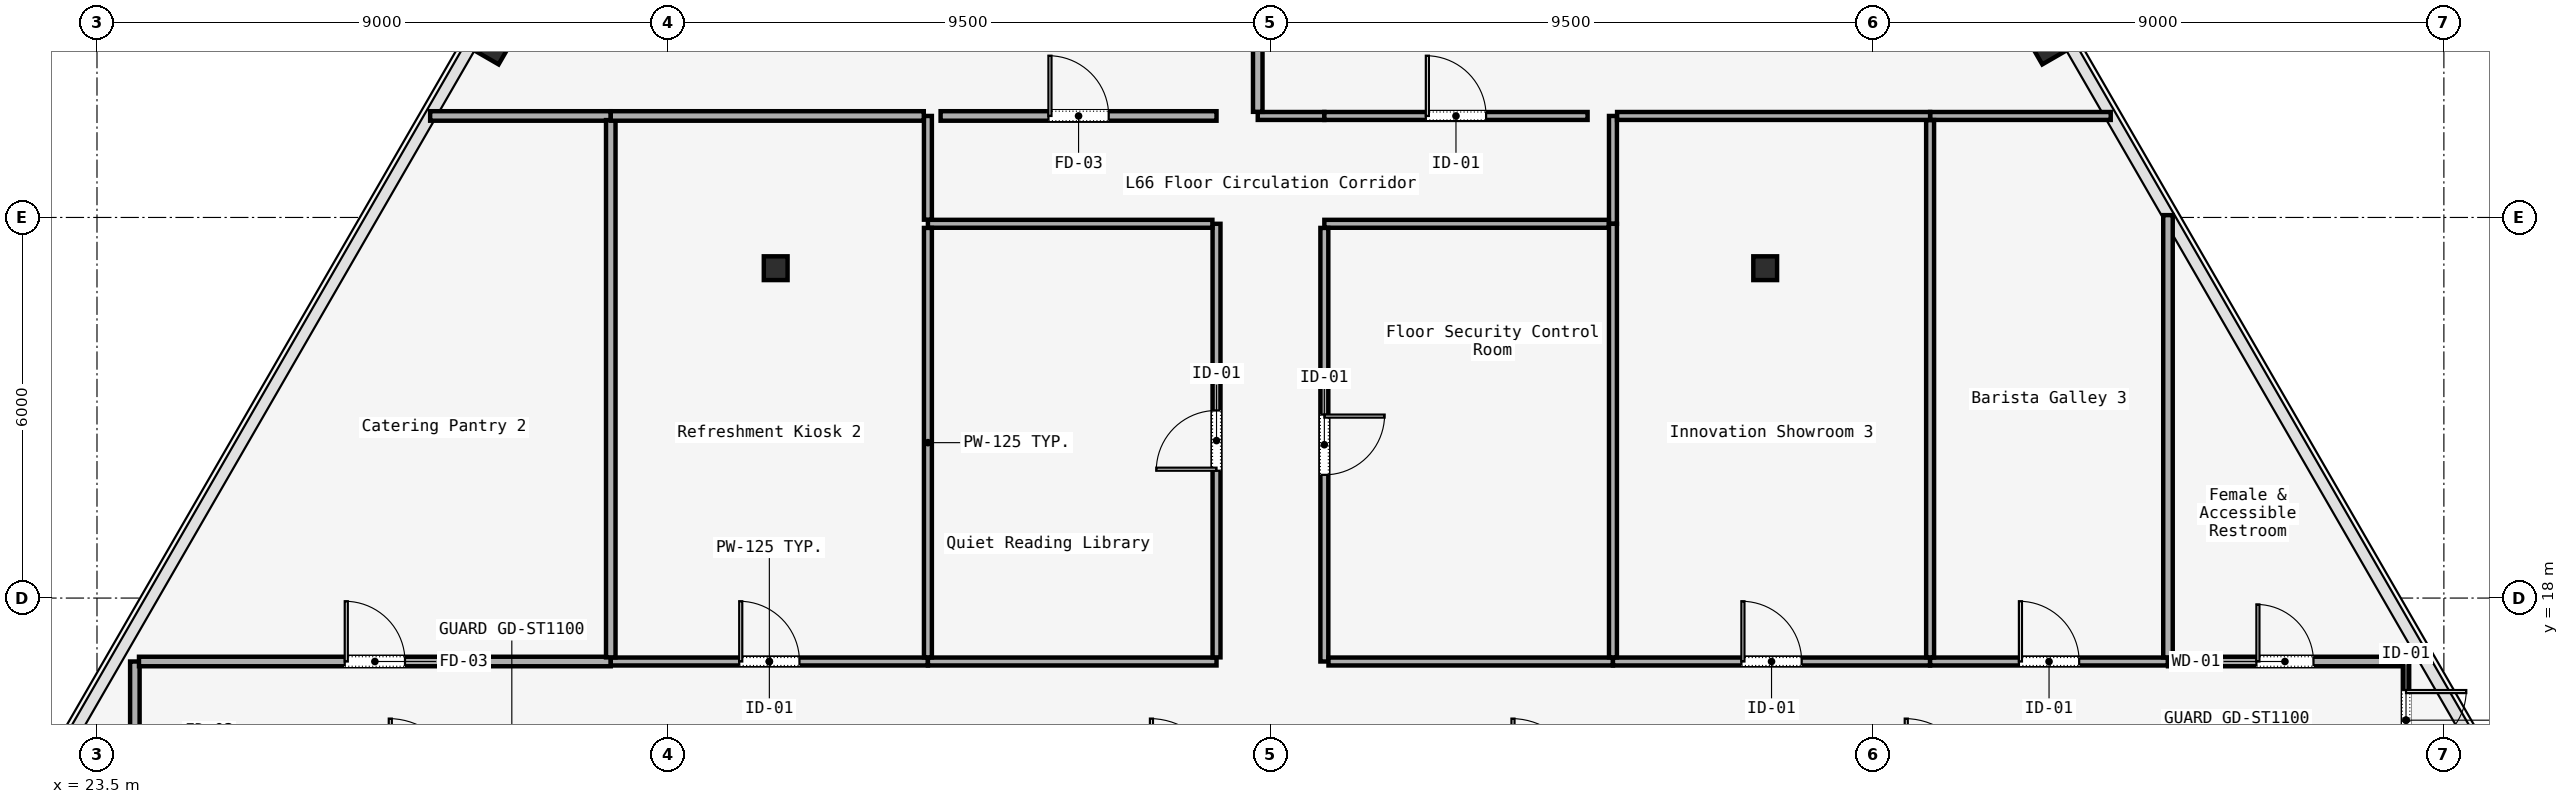
"""IFC4 building model, lengths in metres.
Left out: names, types, materials, properties, quantities, classifications, styles, units other than length and angle.
Written with IfcOpenShell. Run it as: python <this file> out.ifc"""

import sys

from ifc_helpers import new_model, si_unit, direction, frame, frame_2d, origin, origin_2d, place, context, subcontext, project, spatial, rectangle, i_section, extrude, element, fill, save


model = new_model("IFC4")
c1 = context("Model", 3, precision=1e-05, world=origin(), true_north=direction((0.0, 1.0)))
c2 = subcontext(c1, "Body", "Model", "MODEL_VIEW")
j1 = project(units=[si_unit("LENGTHUNIT", "METRE"), si_unit("PLANEANGLEUNIT", "RADIAN")], contexts=[c1])
p1 = place(None, origin())
s1 = spatial("IfcSite", under=j1, at=p1, CompositionType="ELEMENT")
p2 = place(p1, origin())
s2 = spatial("IfcBuilding", under=s1, at=p2, CompositionType="ELEMENT")
p3 = place(p2, frame((0.0, 0.0, 271.2)))
s3 = spatial("IfcBuildingStorey", under=s2, at=p3, CompositionType="ELEMENT", Elevation=271.2)
for number, where, z_axis, x_axis in (
    (1, (34.2, 23.2, 0.0), (0.0, 0.0, 1.0), (1.0, 0.0, 0.0)),
    (2, (49.8, 23.2, 0.0), (0.0, 0.0, 1.0), (1.0, 0.0, 0.0)),
):
    element("IfcColumn", number, at=place(p3, frame(where, z_axis=z_axis, x_axis=x_axis)), inside=s3, PredefinedType="COLUMN", context=c2, shape_type="SweptSolid", body=[
        extrude(i_section(OverallWidth=0.375, OverallDepth=0.375, WebThickness=0.017, FlangeThickness=0.027, FilletRadius=0.015, at=origin_2d()), origin(), (0.0, 0.0, 1.0), 3.58),
    ])
for number, where, z_axis, x_axis in (
    (3, (54.247, 26.693, 0.0), (0.0, 0.0, 1.0), (-0.5, 0.866, 0.0)),
    (4, (29.753, 26.693, 0.0), (0.0, 0.0, 1.0), (0.5, 0.866, 0.0)),
):
    element("IfcColumn", number, at=place(p3, frame(where, z_axis=z_axis, x_axis=x_axis)), inside=s3, PredefinedType="COLUMN", context=c2, shape_type="SweptSolid", body=[
        extrude(i_section(OverallWidth=0.406, OverallDepth=0.416, WebThickness=0.03, FlangeThickness=0.037, FilletRadius=0.015, at=origin_2d()), origin(), (0.0, 0.0, 1.0), 3.58),
    ])
p4 = place(p3, frame((59.903, 17.0, 0.0), z_axis=(0.0, 0.0, 1.0), x_axis=(0.0, -1.0, 0.0)))
e5 = element("IfcWall", 5, at=p4, inside=s3, PredefinedType="MOVABLE", context=c2, shape_type="SweptSolid", body=[
    extrude(rectangle(XDim=1.85, YDim=0.1, at=frame_2d((0.925, 0.0))), origin(), (0.0, 0.0, 1.0), 3.01),
])
p5 = place(p4, frame((0.45, 0.0, 0.0)))
e6 = element("IfcOpeningElement", 6, at=p5, cuts=e5, PredefinedType="OPENING", context=c2, shape_type="SweptSolid", body=[
    extrude(rectangle(XDim=0.95, YDim=2.2, at=frame_2d((0.475, 1.1))), frame((0.0, 0.05, 0.0), z_axis=(0.0, -1.0, 0.0), x_axis=(1.0, 0.0, 0.0)), (0.0, 0.0, 1.0), 0.1),
])
p6 = place(p3, frame((24.097, 15.215, 0.0), z_axis=(0.0, 0.0, 1.0), x_axis=(0.0, 1.0, 0.0)))
e7 = element("IfcWall", 7, at=p6, inside=s3, PredefinedType="PARTITIONING", context=c2, shape_type="SweptSolid", body=[
    extrude(rectangle(XDim=1.785, YDim=0.15, at=frame_2d((0.893, 0.0))), origin(), (0.0, 0.0, 1.0), 3.01),
])
p7 = place(p3, frame((24.162, 17.0, 0.0), z_axis=(0.0, 0.0, 1.0), x_axis=(1.0, 0.0, 0.0)))
e8 = element("IfcWall", 8, at=p7, inside=s3, PredefinedType="PARTITIONING", context=c2, shape_type="SweptSolid", body=[
    extrude(rectangle(XDim=7.438, YDim=0.15, at=frame_2d((3.719, 0.0))), origin(), (0.0, 0.0, 1.0), 3.01),
])
p8 = place(p7, frame((3.244, 0.0, 0.0)))
e9 = element("IfcOpeningElement", 9, at=p8, cuts=e8, PredefinedType="OPENING", context=c2, shape_type="SweptSolid", body=[
    extrude(rectangle(XDim=0.95, YDim=2.2, at=frame_2d((0.475, 1.1))), frame((0.0, 0.075, 0.0), z_axis=(0.0, -1.0, 0.0), x_axis=(1.0, 0.0, 0.0)), (0.0, 0.0, 1.0), 0.15),
])
p9 = place(p3, frame((31.6, 17.0, 0.0), z_axis=(0.0, 0.0, 1.0), x_axis=(1.0, 0.0, 0.0)))
e10 = element("IfcWall", 10, at=p9, inside=s3, PredefinedType="PARTITIONING", context=c2, shape_type="SweptSolid", body=[
    extrude(rectangle(XDim=5.0, YDim=0.125, at=frame_2d((2.5, 0.0))), origin(), (0.0, 0.0, 1.0), 3.01),
])
p10 = place(p9, frame((2.025, 0.0, 0.0)))
e11 = element("IfcOpeningElement", 11, at=p10, cuts=e10, PredefinedType="OPENING", context=c2, shape_type="SweptSolid", body=[
    extrude(rectangle(XDim=0.95, YDim=2.2, at=frame_2d((0.475, 1.1))), frame((0.0, 0.062, 0.0), z_axis=(0.0, -1.0, 0.0), x_axis=(1.0, 0.0, 0.0)), (0.0, 0.0, 1.0), 0.125),
])
p11 = place(p3, frame((36.6, 17.0, 0.0), z_axis=(0.0, 0.0, 1.0), x_axis=(1.0, 0.0, 0.0)))
e12 = element("IfcWall", 12, at=p11, inside=s3, PredefinedType="PARTITIONING", context=c2, shape_type="SweptSolid", body=[
    extrude(rectangle(XDim=4.55, YDim=0.125, at=frame_2d((2.275, 0.0))), origin(), (0.0, 0.0, 1.0), 3.01),
])
p12 = place(p3, frame((41.15, 17.065, 0.0), z_axis=(0.0, 0.0, 1.0), x_axis=(0.0, 1.0, 0.0)))
e13 = element("IfcWall", 13, at=p12, inside=s3, PredefinedType="PARTITIONING", context=c2, shape_type="SweptSolid", body=[
    extrude(rectangle(XDim=6.835, YDim=0.125, at=frame_2d((3.417, 0.0))), origin(), (0.0, 0.0, 1.0), 3.01),
])
p13 = place(p12, frame((2.942, 0.0, 0.0)))
e14 = element("IfcOpeningElement", 14, at=p13, cuts=e13, PredefinedType="OPENING", context=c2, shape_type="SweptSolid", body=[
    extrude(rectangle(XDim=0.95, YDim=2.2, at=frame_2d((0.475, 1.1))), frame((0.0, 0.062, 0.0), z_axis=(0.0, -1.0, 0.0), x_axis=(1.0, 0.0, 0.0)), (0.0, 0.0, 1.0), 0.125),
])
p14 = place(p3, frame((41.085, 23.9, 0.0), z_axis=(0.0, 0.0, 1.0), x_axis=(-1.0, 0.0, 0.0)))
e15 = element("IfcWall", 15, at=p14, inside=s3, PredefinedType="PARTITIONING", context=c2, shape_type="SweptSolid", body=[
    extrude(rectangle(XDim=4.485, YDim=0.125, at=frame_2d((2.242, 0.0))), origin(), (0.0, 0.0, 1.0), 3.01),
])
p15 = place(p3, frame((36.6, 23.965, 0.0), z_axis=(0.0, 0.0, 1.0), x_axis=(0.0, 1.0, 0.0)))
e16 = element("IfcWall", 16, at=p15, inside=s3, PredefinedType="PARTITIONING", context=c2, shape_type="SweptSolid", body=[
    extrude(rectangle(XDim=1.635, YDim=0.125, at=frame_2d((0.817, 0.0))), origin(), (0.0, 0.0, 1.0), 3.01),
])
p16 = place(p3, frame((36.8, 25.6, 0.0), z_axis=(0.0, 0.0, 1.0), x_axis=(1.0, 0.0, 0.0)))
e17 = element("IfcWall", 17, at=p16, inside=s3, PredefinedType="PARTITIONING", context=c2, shape_type="SweptSolid", body=[
    extrude(rectangle(XDim=4.35, YDim=0.15, at=frame_2d((2.175, 0.0))), origin(), (0.0, 0.0, 1.0), 3.01),
])
p17 = place(p16, frame((1.7, 0.0, 0.0)))
e18 = element("IfcOpeningElement", 18, at=p17, cuts=e17, PredefinedType="OPENING", context=c2, shape_type="SweptSolid", body=[
    extrude(rectangle(XDim=0.95, YDim=2.2, at=frame_2d((0.475, 1.1))), frame((0.0, 0.075, 0.0), z_axis=(0.0, -1.0, 0.0), x_axis=(1.0, 0.0, 0.0)), (0.0, 0.0, 1.0), 0.15),
])
p18 = place(p3, frame((41.8, 25.6, 0.0), z_axis=(0.0, 0.0, 1.0), x_axis=(1.0, 0.0, 0.0)))
e19 = element("IfcWall", 19, at=p18, inside=s3, PredefinedType="PARTITIONING", context=c2, shape_type="SweptSolid", body=[
    extrude(rectangle(XDim=1.05, YDim=0.125, at=frame_2d((0.525, 0.0))), origin(), (0.0, 0.0, 1.0), 3.01),
])
p19 = place(p3, frame((42.85, 25.6, 0.0), z_axis=(0.0, 0.0, 1.0), x_axis=(1.0, 0.0, 0.0)))
e20 = element("IfcWall", 20, at=p19, inside=s3, PredefinedType="PARTITIONING", context=c2, shape_type="SweptSolid", body=[
    extrude(rectangle(XDim=4.15, YDim=0.125, at=frame_2d((2.075, 0.0))), origin(), (0.0, 0.0, 1.0), 3.01),
])
p20 = place(p19, frame((1.6, 0.0, 0.0)))
e21 = element("IfcOpeningElement", 21, at=p20, cuts=e20, PredefinedType="OPENING", context=c2, shape_type="SweptSolid", body=[
    extrude(rectangle(XDim=0.95, YDim=2.2, at=frame_2d((0.475, 1.1))), frame((0.0, 0.062, 0.0), z_axis=(0.0, -1.0, 0.0), x_axis=(1.0, 0.0, 0.0)), (0.0, 0.0, 1.0), 0.125),
])
p21 = place(p3, frame((47.4, 25.6, 0.0), z_axis=(0.0, 0.0, 1.0), x_axis=(0.0, -1.0, 0.0)))
e22 = element("IfcWall", 22, at=p21, inside=s3, PredefinedType="PARTITIONING", context=c2, shape_type="SweptSolid", body=[
    extrude(rectangle(XDim=1.7, YDim=0.125, at=frame_2d((0.85, 0.0))), origin(), (0.0, 0.0, 1.0), 3.01),
])
p22 = place(p3, frame((47.335, 23.9, 0.0), z_axis=(0.0, 0.0, 1.0), x_axis=(-1.0, 0.0, 0.0)))
e23 = element("IfcWall", 23, at=p22, inside=s3, PredefinedType="PARTITIONING", context=c2, shape_type="SweptSolid", body=[
    extrude(rectangle(XDim=4.485, YDim=0.125, at=frame_2d((2.242, 0.0))), origin(), (0.0, 0.0, 1.0), 3.01),
])
p23 = place(p3, frame((42.85, 23.835, 0.0), z_axis=(0.0, 0.0, 1.0), x_axis=(0.0, -1.0, 0.0)))
e24 = element("IfcWall", 24, at=p23, inside=s3, PredefinedType="PARTITIONING", context=c2, shape_type="SweptSolid", body=[
    extrude(rectangle(XDim=6.835, YDim=0.125, at=frame_2d((3.417, 0.0))), origin(), (0.0, 0.0, 1.0), 3.01),
])
p24 = place(p23, frame((2.942, 0.0, 0.0)))
e25 = element("IfcOpeningElement", 25, at=p24, cuts=e24, PredefinedType="OPENING", context=c2, shape_type="SweptSolid", body=[
    extrude(rectangle(XDim=0.95, YDim=2.2, at=frame_2d((0.475, 1.1))), frame((0.0, 0.062, 0.0), z_axis=(0.0, -1.0, 0.0), x_axis=(1.0, 0.0, 0.0)), (0.0, 0.0, 1.0), 0.125),
])
p25 = place(p3, frame((42.915, 17.0, 0.0), z_axis=(0.0, 0.0, 1.0), x_axis=(1.0, 0.0, 0.0)))
e26 = element("IfcWall", 26, at=p25, inside=s3, PredefinedType="PARTITIONING", context=c2, shape_type="SweptSolid", body=[
    extrude(rectangle(XDim=4.485, YDim=0.125, at=frame_2d((2.242, 0.0))), origin(), (0.0, 0.0, 1.0), 3.01),
])
p26 = place(p3, frame((47.4, 17.0, 0.0), z_axis=(0.0, 0.0, 1.0), x_axis=(1.0, 0.0, 0.0)))
e27 = element("IfcWall", 27, at=p26, inside=s3, PredefinedType="PARTITIONING", context=c2, shape_type="SweptSolid", body=[
    extrude(rectangle(XDim=5.0, YDim=0.125, at=frame_2d((2.5, 0.0))), origin(), (0.0, 0.0, 1.0), 3.01),
])
p27 = place(p26, frame((2.025, 0.0, 0.0)))
e28 = element("IfcOpeningElement", 28, at=p27, cuts=e27, PredefinedType="OPENING", context=c2, shape_type="SweptSolid", body=[
    extrude(rectangle(XDim=0.95, YDim=2.2, at=frame_2d((0.475, 1.1))), frame((0.0, 0.062, 0.0), z_axis=(0.0, -1.0, 0.0), x_axis=(1.0, 0.0, 0.0)), (0.0, 0.0, 1.0), 0.125),
])
p28 = place(p3, frame((52.4, 17.0, 0.0), z_axis=(0.0, 0.0, 1.0), x_axis=(1.0, 0.0, 0.0)))
e29 = element("IfcWall", 29, at=p28, inside=s3, PredefinedType="PARTITIONING", context=c2, shape_type="SweptSolid", body=[
    extrude(rectangle(XDim=3.75, YDim=0.125, at=frame_2d((1.875, 0.0))), origin(), (0.0, 0.0, 1.0), 3.01),
])
p29 = place(p28, frame((1.4, 0.0, 0.0)))
e30 = element("IfcOpeningElement", 30, at=p29, cuts=e29, PredefinedType="OPENING", context=c2, shape_type="SweptSolid", body=[
    extrude(rectangle(XDim=0.95, YDim=2.2, at=frame_2d((0.475, 1.1))), frame((0.0, 0.062, 0.0), z_axis=(0.0, -1.0, 0.0), x_axis=(1.0, 0.0, 0.0)), (0.0, 0.0, 1.0), 0.125),
])
p30 = place(p3, frame((56.15, 17.0, 0.0), z_axis=(0.0, 0.0, 1.0), x_axis=(1.0, 0.0, 0.0)))
e31 = element("IfcWall", 31, at=p30, inside=s3, PredefinedType="PARTITIONING", context=c2, shape_type="SweptSolid", body=[
    extrude(rectangle(XDim=3.688, YDim=0.15, at=frame_2d((1.844, 0.0))), origin(), (0.0, 0.0, 1.0), 3.01),
])
p31 = place(p30, frame((1.394, 0.0, 0.0)))
e32 = element("IfcOpeningElement", 32, at=p31, cuts=e31, PredefinedType="OPENING", context=c2, shape_type="SweptSolid", body=[
    extrude(rectangle(XDim=0.9, YDim=2.15, at=frame_2d((0.45, 1.075))), frame((0.0, 0.075, 0.0), z_axis=(0.0, -1.0, 0.0), x_axis=(1.0, 0.0, 0.0)), (0.0, 0.0, 1.0), 0.15),
])
p32 = place(p3, frame((56.15, 17.065, 0.0), z_axis=(0.0, 0.0, 1.0), x_axis=(0.0, 1.0, 0.0)))
e33 = element("IfcWall", 33, at=p32, inside=s3, PredefinedType="PARTITIONING", context=c2, shape_type="SweptSolid", body=[
    extrude(rectangle(XDim=6.972, YDim=0.15, at=frame_2d((3.486, 0.0))), origin(), (0.0, 0.0, 1.0), 3.01),
])
p33 = place(p3, frame((36.6, 17.065, 0.0), z_axis=(0.0, 0.0, 1.0), x_axis=(0.0, 1.0, 0.0)))
e34 = element("IfcWall", 34, at=p33, inside=s3, PredefinedType="PARTITIONING", context=c2, shape_type="SweptSolid", body=[
    extrude(rectangle(XDim=6.77, YDim=0.125, at=frame_2d((3.385, 0.0))), origin(), (0.0, 0.0, 1.0), 3.01),
])
p34 = place(p3, frame((47.4, 23.9, 0.0), z_axis=(0.0, 0.0, 1.0), x_axis=(0.0, -1.0, 0.0)))
e35 = element("IfcWall", 35, at=p34, inside=s3, PredefinedType="PARTITIONING", context=c2, shape_type="SweptSolid", body=[
    extrude(rectangle(XDim=6.835, YDim=0.125, at=frame_2d((3.417, 0.0))), origin(), (0.0, 0.0, 1.0), 3.01),
])
p35 = place(p3, frame((28.752, 25.6, 0.0), z_axis=(0.0, 0.0, 1.0), x_axis=(1.0, 0.0, 0.0)))
e36 = element("IfcWall", 36, at=p35, inside=s3, PredefinedType="PARTITIONING", context=c2, shape_type="SweptSolid", body=[
    extrude(rectangle(XDim=2.848, YDim=0.15, at=frame_2d((1.424, 0.0))), origin(), (0.0, 0.0, 1.0), 3.01),
])
p36 = place(p3, frame((31.6, 25.535, 0.0), z_axis=(0.0, 0.0, 1.0), x_axis=(0.0, -1.0, 0.0)))
e37 = element("IfcWall", 37, at=p36, inside=s3, PredefinedType="PARTITIONING", context=c2, shape_type="SweptSolid", body=[
    extrude(rectangle(XDim=8.47, YDim=0.15, at=frame_2d((4.235, 0.0))), origin(), (0.0, 0.0, 1.0), 3.01),
])
p37 = place(p3, frame((52.4, 25.6, 0.0), z_axis=(0.0, 0.0, 1.0), x_axis=(1.0, 0.0, 0.0)))
e38 = element("IfcWall", 38, at=p37, inside=s3, PredefinedType="PARTITIONING", context=c2, shape_type="SweptSolid", body=[
    extrude(rectangle(XDim=2.848, YDim=0.125, at=frame_2d((1.424, 0.0))), origin(), (0.0, 0.0, 1.0), 3.01),
])
p38 = place(p3, frame((52.4, 17.065, 0.0), z_axis=(0.0, 0.0, 1.0), x_axis=(0.0, 1.0, 0.0)))
e39 = element("IfcWall", 39, at=p38, inside=s3, PredefinedType="PARTITIONING", context=c2, shape_type="SweptSolid", body=[
    extrude(rectangle(XDim=8.47, YDim=0.125, at=frame_2d((4.235, 0.0))), origin(), (0.0, 0.0, 1.0), 3.01),
])
p39 = place(p3, frame((31.6, 25.6, 0.0), z_axis=(0.0, 0.0, 1.0), x_axis=(1.0, 0.0, 0.0)))
e40 = element("IfcWall", 40, at=p39, inside=s3, PredefinedType="PARTITIONING", context=c2, shape_type="SweptSolid", body=[
    extrude(rectangle(XDim=4.935, YDim=0.15, at=frame_2d((2.467, 0.0))), origin(), (0.0, 0.0, 1.0), 3.01),
])
p40 = place(p3, frame((47.465, 25.6, 0.0), z_axis=(0.0, 0.0, 1.0), x_axis=(1.0, 0.0, 0.0)))
e41 = element("IfcWall", 41, at=p40, inside=s3, PredefinedType="PARTITIONING", context=c2, shape_type="SweptSolid", body=[
    extrude(rectangle(XDim=4.935, YDim=0.125, at=frame_2d((2.467, 0.0))), origin(), (0.0, 0.0, 1.0), 3.01),
])
p41 = place(p3, frame((41.8, 44.138, 0.0), z_axis=(0.0, 0.0, 1.0), x_axis=(0.0, -1.0, 0.0)))
e42 = element("IfcWall", 42, at=p41, inside=s3, PredefinedType="PARTITIONING", context=c2, shape_type="SweptSolid", body=[
    extrude(rectangle(XDim=18.473, YDim=0.15, at=frame_2d((9.236, 0.0))), origin(), (0.0, 0.0, 1.0), 3.01),
])
p42 = place(p5, origin())
e43 = element("IfcDoor", 43, at=p42, inside=s3, OperationType="SINGLE_SWING_LEFT", PredefinedType="DOOR", context=c2, shape_type="SweptSolid", body=[
    extrude(rectangle(XDim=0.95, YDim=2.2, at=frame_2d((0.475, 1.1))), frame((0.0, 0.025, 0.0), z_axis=(0.0, -1.0, 0.0), x_axis=(1.0, 0.0, 0.0)), (0.0, 0.0, 1.0), 0.05),
])
fill(e6, e43)
p43 = place(p31, origin())
e44 = element("IfcDoor", 44, at=p43, inside=s3, OperationType="SINGLE_SWING_RIGHT", PredefinedType="DOOR", context=c2, shape_type="SweptSolid", body=[
    extrude(rectangle(XDim=0.9, YDim=2.15, at=frame_2d((0.45, 1.075))), frame((0.0, 0.025, 0.0), z_axis=(0.0, -1.0, 0.0), x_axis=(1.0, 0.0, 0.0)), (0.0, 0.0, 1.0), 0.05),
])
fill(e32, e44)
p44 = place(p13, origin())
e45 = element("IfcDoor", 45, at=p44, inside=s3, OperationType="SINGLE_SWING_LEFT", PredefinedType="DOOR", context=c2, shape_type="SweptSolid", body=[
    extrude(rectangle(XDim=0.95, YDim=2.2, at=frame_2d((0.475, 1.1))), frame((0.0, 0.025, 0.0), z_axis=(0.0, -1.0, 0.0), x_axis=(1.0, 0.0, 0.0)), (0.0, 0.0, 1.0), 0.05),
])
fill(e14, e45)
p45 = place(p24, origin())
e46 = element("IfcDoor", 46, at=p45, inside=s3, OperationType="SINGLE_SWING_RIGHT", PredefinedType="DOOR", context=c2, shape_type="SweptSolid", body=[
    extrude(rectangle(XDim=0.95, YDim=2.2, at=frame_2d((0.475, 1.1))), frame((0.0, 0.025, 0.0), z_axis=(0.0, -1.0, 0.0), x_axis=(1.0, 0.0, 0.0)), (0.0, 0.0, 1.0), 0.05),
])
fill(e25, e46)
p46 = place(p8, origin())
e47 = element("IfcDoor", 47, at=p46, inside=s3, OperationType="SINGLE_SWING_LEFT", PredefinedType="DOOR", context=c2, shape_type="SweptSolid", body=[
    extrude(rectangle(XDim=0.95, YDim=2.2, at=frame_2d((0.475, 1.1))), frame((0.0, 0.025, 0.0), z_axis=(0.0, -1.0, 0.0), x_axis=(1.0, 0.0, 0.0)), (0.0, 0.0, 1.0), 0.05),
])
fill(e9, e47)
p47 = place(p29, origin())
e48 = element("IfcDoor", 48, at=p47, inside=s3, OperationType="SINGLE_SWING_RIGHT", PredefinedType="DOOR", context=c2, shape_type="SweptSolid", body=[
    extrude(rectangle(XDim=0.95, YDim=2.2, at=frame_2d((0.475, 1.1))), frame((0.0, 0.025, 0.0), z_axis=(0.0, -1.0, 0.0), x_axis=(1.0, 0.0, 0.0)), (0.0, 0.0, 1.0), 0.05),
])
fill(e30, e48)
p48 = place(p10, origin())
e49 = element("IfcDoor", 49, at=p48, inside=s3, OperationType="SINGLE_SWING_LEFT", PredefinedType="DOOR", context=c2, shape_type="SweptSolid", body=[
    extrude(rectangle(XDim=0.95, YDim=2.2, at=frame_2d((0.475, 1.1))), frame((0.0, 0.025, 0.0), z_axis=(0.0, -1.0, 0.0), x_axis=(1.0, 0.0, 0.0)), (0.0, 0.0, 1.0), 0.05),
])
fill(e11, e49)
p49 = place(p27, origin())
e50 = element("IfcDoor", 50, at=p49, inside=s3, OperationType="SINGLE_SWING_RIGHT", PredefinedType="DOOR", context=c2, shape_type="SweptSolid", body=[
    extrude(rectangle(XDim=0.95, YDim=2.2, at=frame_2d((0.475, 1.1))), frame((0.0, 0.025, 0.0), z_axis=(0.0, -1.0, 0.0), x_axis=(1.0, 0.0, 0.0)), (0.0, 0.0, 1.0), 0.05),
])
fill(e28, e50)
p50 = place(p17, origin())
e51 = element("IfcDoor", 51, at=p50, inside=s3, OperationType="SINGLE_SWING_LEFT", PredefinedType="DOOR", context=c2, shape_type="SweptSolid", body=[
    extrude(rectangle(XDim=0.95, YDim=2.2, at=frame_2d((0.475, 1.1))), frame((0.0, 0.025, 0.0), z_axis=(0.0, -1.0, 0.0), x_axis=(1.0, 0.0, 0.0)), (0.0, 0.0, 1.0), 0.05),
])
fill(e18, e51)
p51 = place(p20, origin())
e52 = element("IfcDoor", 52, at=p51, inside=s3, OperationType="SINGLE_SWING_RIGHT", PredefinedType="DOOR", context=c2, shape_type="SweptSolid", body=[
    extrude(rectangle(XDim=0.95, YDim=2.2, at=frame_2d((0.475, 1.1))), frame((0.0, 0.025, 0.0), z_axis=(0.0, -1.0, 0.0), x_axis=(1.0, 0.0, 0.0)), (0.0, 0.0, 1.0), 0.05),
])
fill(e21, e52)
save(model, sys.argv[1])
